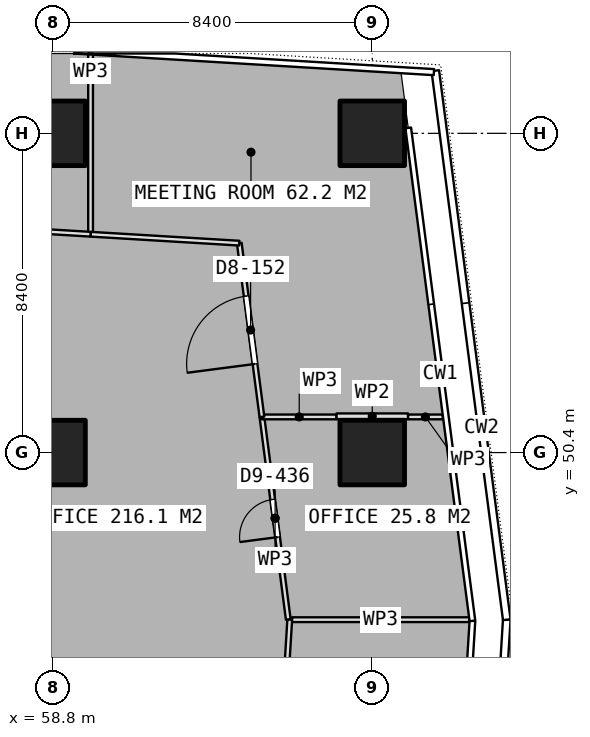
"""IFC4 building model, lengths in metres.
Left out: names, types, materials, properties, quantities, classifications, styles, units other than length and angle.
Written with IfcOpenShell. Run it as: python <this file> out.ifc"""

import sys

from ifc_helpers import new_model, si_unit, direction, frame, frame_2d, origin, origin_2d, place, context, subcontext, project, spatial, rectangle, extrude, element, fill, save


model = new_model("IFC4")
c1 = context("Model", 3, precision=1e-05, world=origin(), true_north=direction((0.0, 1.0)))
c2 = subcontext(c1, "Body", "Model", "MODEL_VIEW")
j1 = project(units=[si_unit("LENGTHUNIT", "METRE"), si_unit("PLANEANGLEUNIT", "RADIAN")], contexts=[c1])
p1 = place(None, origin())
s1 = spatial("IfcSite", under=j1, at=p1, CompositionType="ELEMENT")
p2 = place(p1, origin())
s2 = spatial("IfcBuilding", under=s1, at=p2, CompositionType="ELEMENT")
p3 = place(p2, frame((0.0, 0.0, 117.8)))
s3 = spatial("IfcBuildingStorey", under=s2, at=p3, CompositionType="ELEMENT", Elevation=117.8)
for number, where, z_axis, x_axis in (
    (1, (58.8, 50.4, 0.0), (0.0, 0.0, 1.0), (1.0, 0.0, 0.0)),
    (2, (58.8, 58.8, 0.0), (0.0, 0.0, 1.0), (1.0, 0.0, 0.0)),
    (3, (67.2, 50.4, 0.0), (0.0, 0.0, 1.0), (1.0, 0.0, 0.0)),
    (4, (67.2, 58.8, 0.0), (0.0, 0.0, 1.0), (1.0, 0.0, 0.0)),
):
    element("IfcColumn", number, at=place(p3, frame(where, z_axis=z_axis, x_axis=x_axis)), inside=s3, PredefinedType="COLUMN", context=c2, shape_type="SweptSolid", body=[
        extrude(rectangle(XDim=1.7, YDim=1.7, at=origin_2d()), origin(), (0.0, 0.0, 1.0), 3.75),
    ])
p4 = place(p3, frame((64.504, 37.437, 0.0), z_axis=(0.0, 0.0, 1.0), x_axis=(0.061148210755, 0.998128697274, 0.0)))
e5 = element("IfcWall", 5, at=p4, inside=s3, PredefinedType="PARTITIONING", context=c2, shape_type="SweptSolid", body=[
    extrude(rectangle(XDim=8.588, YDim=0.125, at=frame_2d((4.294, 0.0))), origin(), (0.0, 0.0, 1.0), 3.5),
])
p5 = place(p4, frame((3.791, 0.0, 0.0)))
e6 = element("IfcOpeningElement", 6, at=p5, cuts=e5, PredefinedType="OPENING", context=c2, shape_type="SweptSolid", body=[
    extrude(rectangle(XDim=1.0, YDim=2.1, at=frame_2d((0.5, 1.05))), frame((0.0, 0.073, 0.0), z_axis=(0.0, -1.0, 0.0), x_axis=(1.0, 0.0, 0.0)), (0.0, 0.0, 1.0), 0.145),
])
p6 = place(p3, frame((65.091, 46.003, 0.0), z_axis=(0.0, 0.0, 1.0), x_axis=(1.0, 0.0, 0.0)))
e7 = element("IfcWall", 7, at=p6, inside=s3, PredefinedType="PARTITIONING", context=c2, shape_type="SweptSolid", body=[
    extrude(rectangle(XDim=4.66, YDim=0.125, at=frame_2d((2.33, 0.0))), origin(), (0.0, 0.0, 1.0), 3.5),
])
p7 = place(p3, frame((64.99, 46.011, 0.0), z_axis=(0.0, 0.0, 1.0), x_axis=(-0.128983610929, 0.991646725458, 0.0)))
e8 = element("IfcWall", 8, at=p7, inside=s3, PredefinedType="PARTITIONING", context=c2, shape_type="SweptSolid", body=[
    extrude(rectangle(XDim=5.372, YDim=0.125, at=frame_2d((2.686, 0.0))), origin(), (0.0, 0.0, 1.0), 3.5),
])
p8 = place(p7, frame((2.182, 0.0, 0.0)))
e9 = element("IfcOpeningElement", 9, at=p8, cuts=e8, PredefinedType="OPENING", context=c2, shape_type="SweptSolid", body=[
    extrude(rectangle(XDim=1.0, YDim=2.1, at=frame_2d((0.5, 1.05))), frame((0.0, 0.073, 0.0), z_axis=(0.0, -1.0, 0.0), x_axis=(1.0, 0.0, 0.0)), (0.0, 0.0, 1.0), 0.145),
])
p9 = place(p3, frame((64.297, 51.338, 0.0), z_axis=(0.0, 0.0, 1.0), x_axis=(1.0, 0.0, 0.0)))
e10 = element("IfcWall", 10, at=p9, inside=s3, PredefinedType="PARTITIONING", context=c2, shape_type="SweptSolid", body=[
    extrude(rectangle(XDim=1.963, YDim=0.125, at=frame_2d((0.981, 0.0))), origin(), (0.0, 0.0, 1.0), 3.5),
])
p10 = place(p3, frame((68.14, 51.338, 0.0), z_axis=(0.0, 0.0, 1.0), x_axis=(1.0, 0.0, 0.0)))
e11 = element("IfcWall", 11, at=p10, inside=s3, PredefinedType="PARTITIONING", context=c2, shape_type="SweptSolid", body=[
    extrude(rectangle(XDim=0.917, YDim=0.125, at=frame_2d((0.458, 0.0))), origin(), (0.0, 0.0, 1.0), 3.5),
])
p11 = place(p3, frame((59.788, 56.145, 0.0), z_axis=(0.0, 0.0, 1.0), x_axis=(0.0, 1.0, 0.0)))
e12 = element("IfcWall", 12, at=p11, inside=s3, PredefinedType="PARTITIONING", context=c2, shape_type="SweptSolid", body=[
    extrude(rectangle(XDim=4.758, YDim=0.125, at=frame_2d((2.379, 0.0))), origin(), (0.0, 0.0, 1.0), 3.5),
])
p12 = place(p3, frame((64.297, 51.339, 0.0), z_axis=(0.0, 0.0, 1.0), x_axis=(-0.129339184068, 0.991600411186, 0.0)))
e13 = element("IfcWall", 13, at=p12, inside=s3, PredefinedType="PARTITIONING", context=c2, shape_type="SweptSolid", body=[
    extrude(rectangle(XDim=4.61, YDim=0.125, at=frame_2d((2.305, 0.0))), origin(), (0.0, 0.0, 1.0), 3.5),
])
p13 = place(p12, frame((1.405, 0.0, 0.0)))
e14 = element("IfcOpeningElement", 14, at=p13, cuts=e13, PredefinedType="OPENING", context=c2, shape_type="SweptSolid", body=[
    extrude(rectangle(XDim=1.8, YDim=2.1, at=frame_2d((0.9, 1.05))), frame((0.0, 0.073, 0.0), z_axis=(0.0, -1.0, 0.0), x_axis=(1.0, 0.0, 0.0)), (0.0, 0.0, 1.0), 0.145),
])
p14 = place(p3, frame((63.701, 55.91, 0.0), z_axis=(0.0, 0.0, 1.0), x_axis=(-0.998199703309, 0.059977931883, 0.0)))
e15 = element("IfcWall", 15, at=p14, inside=s3, PredefinedType="PARTITIONING", context=c2, shape_type="SweptSolid", body=[
    extrude(rectangle(XDim=3.92, YDim=0.125, at=frame_2d((1.96, 0.0))), origin(), (0.0, 0.0, 1.0), 3.5),
])
p15 = place(p3, frame((59.787, 56.145, 0.0), z_axis=(0.0, 0.0, 1.0), x_axis=(-0.998201048184, 0.059955545233, 0.0)))
e16 = element("IfcWall", 16, at=p15, inside=s3, PredefinedType="PARTITIONING", context=c2, shape_type="SweptSolid", body=[
    extrude(rectangle(XDim=8.307, YDim=0.125, at=frame_2d((4.153, 0.0))), origin(), (0.0, 0.0, 1.0), 3.5),
])
p16 = place(p15, frame((3.653, 0.0, 0.0)))
e17 = element("IfcOpeningElement", 17, at=p16, cuts=e16, PredefinedType="OPENING", context=c2, shape_type="SweptSolid", body=[
    extrude(rectangle(XDim=1.0, YDim=2.1, at=frame_2d((0.5, 1.05))), frame((0.0, 0.073, 0.0), z_axis=(0.0, -1.0, 0.0), x_axis=(1.0, 0.0, 0.0)), (0.0, 0.0, 1.0), 0.145),
])
p17 = place(p3, frame((68.14, 51.355, 0.0), z_axis=(0.0, 0.0, 1.0), x_axis=(-1.0, 0.0, 0.0)))
e18 = element("IfcWall", 18, at=p17, inside=s3, PredefinedType="PARTITIONING", context=c2, shape_type="SweptSolid", body=[
    extrude(rectangle(XDim=1.88, YDim=0.15, at=frame_2d((0.94, 0.0))), origin(), (0.0, 0.0, 1.0), 3.5),
])
p18 = place(p8, origin())
e19 = element("IfcDoor", 19, at=p18, inside=s3, OperationType="SINGLE_SWING_LEFT", PredefinedType="DOOR", context=c2, shape_type="SweptSolid", body=[
    extrude(rectangle(XDim=1.0, YDim=2.1, at=frame_2d((0.5, 1.05))), frame((0.0, 0.025, 0.0), z_axis=(0.0, -1.0, 0.0), x_axis=(1.0, 0.0, 0.0)), (0.0, 0.0, 1.0), 0.05),
])
fill(e9, e19)
p19 = place(p13, origin())
e20 = element("IfcDoor", 20, at=p19, inside=s3, OperationType="DOUBLE_DOOR_SINGLE_SWING", PredefinedType="DOOR", context=c2, shape_type="SweptSolid", body=[
    extrude(rectangle(XDim=1.8, YDim=2.1, at=frame_2d((0.9, 1.05))), frame((0.0, 0.025, 0.0), z_axis=(0.0, -1.0, 0.0), x_axis=(1.0, 0.0, 0.0)), (0.0, 0.0, 1.0), 0.05),
])
fill(e14, e20)
save(model, sys.argv[1])
